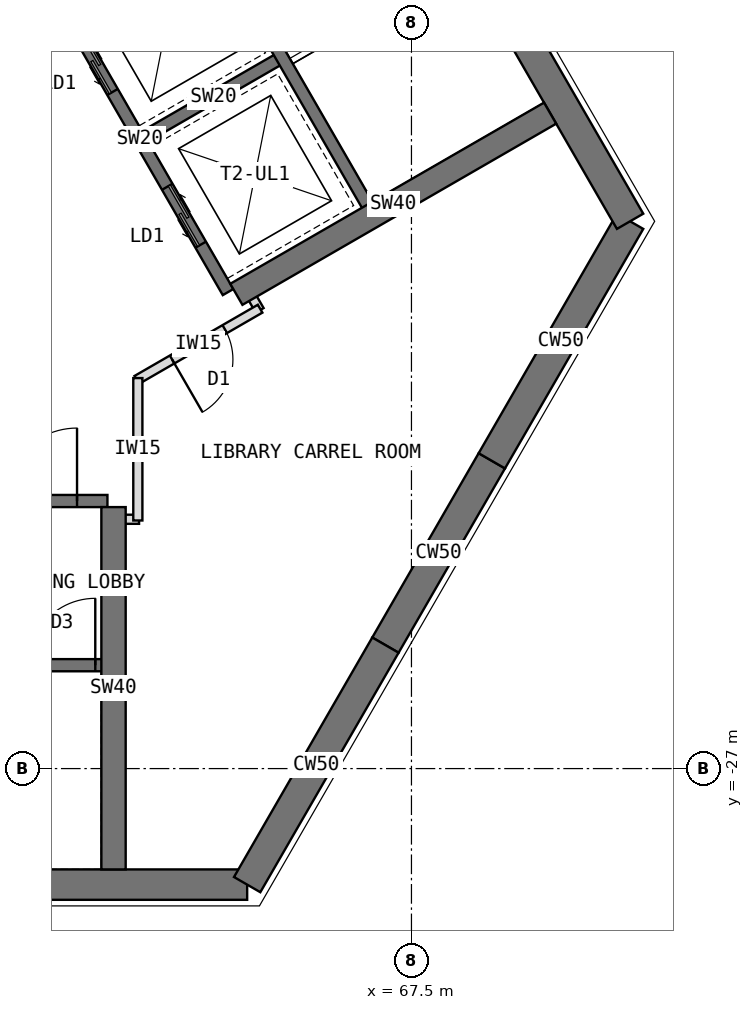
"""IFC4 building model, lengths in metres.
Left out: names, types, materials, properties, quantities, classifications, styles, units other than length and angle.
Written with IfcOpenShell. Run it as: python <this file> out.ifc"""

import sys

from ifc_helpers import new_model, si_unit, direction, frame, frame_2d, origin, place, context, subcontext, project, spatial, rectangle, extrude, element, fill, save


model = new_model("IFC4")
c1 = context("Model", 3, precision=1e-05, world=origin(), true_north=direction((0.0, 1.0)))
c2 = subcontext(c1, "Body", "Model", "MODEL_VIEW")
j1 = project(units=[si_unit("LENGTHUNIT", "METRE"), si_unit("PLANEANGLEUNIT", "RADIAN")], contexts=[c1])
p1 = place(None, origin())
s1 = spatial("IfcSite", under=j1, at=p1, CompositionType="ELEMENT")
p2 = place(p1, origin())
s2 = spatial("IfcBuilding", under=s1, at=p2, CompositionType="ELEMENT")
p3 = place(p2, frame((0.0, 0.0, 194.5)))
s3 = spatial("IfcBuildingStorey", under=s2, at=p3, CompositionType="ELEMENT", Elevation=194.5)
p4 = place(p3, frame((52.202, -28.908, 0.0), z_axis=(0.0, 0.0, 1.0), x_axis=(1.0, 0.0, 0.0)))
e1 = element("IfcWall", 1, at=p4, inside=s3, PredefinedType="SHEAR", context=c2, shape_type="SweptSolid", body=[
    extrude(rectangle(XDim=12.596, YDim=0.5, at=frame_2d((6.298, 0.0))), origin(), (0.0, 0.0, 1.0), 4.0),
])
p5 = place(p3, frame((64.798, -28.908, 0.0), z_axis=(0.0, 0.0, 1.0), x_axis=(0.499984222037, 0.866034513004, 0.0)))
e2 = element("IfcWall", 2, at=p5, inside=s3, PredefinedType="SHEAR", context=c2, shape_type="SweptSolid", body=[
    extrude(rectangle(XDim=4.548, YDim=0.5, at=frame_2d((2.274, 0.0))), origin(), (0.0, 0.0, 1.0), 4.0),
])
p6 = place(p3, frame((67.072, -24.97, 0.0), z_axis=(0.0, 0.0, 1.0), x_axis=(0.500010275428, 0.866019471182, 0.0)))
e3 = element("IfcWall", 3, at=p6, inside=s3, PredefinedType="SHEAR", context=c2, shape_type="SweptSolid", body=[
    extrude(rectangle(XDim=3.5, YDim=0.5, at=frame_2d((1.75, 0.0))), origin(), (0.0, 0.0, 1.0), 4.0),
])
p7 = place(p3, frame((68.822, -21.939, 0.0), z_axis=(0.0, 0.0, 1.0), x_axis=(0.500024481964, 0.866011268655, 0.0)))
e4 = element("IfcWall", 4, at=p7, inside=s3, PredefinedType="SHEAR", context=c2, shape_type="SweptSolid", body=[
    extrude(rectangle(XDim=4.548, YDim=0.5, at=frame_2d((2.274, 0.0))), origin(), (0.0, 0.0, 1.0), 4.0),
])
p8 = place(p3, frame((71.096, -18.0, 0.0), z_axis=(0.0, 0.0, 1.0), x_axis=(-0.500005998175, 0.866021940709, 0.0)))
e5 = element("IfcWall", 5, at=p8, inside=s3, PredefinedType="SHEAR", context=c2, shape_type="SweptSolid", body=[
    extrude(rectangle(XDim=12.596, YDim=0.5, at=frame_2d((6.298, 0.0))), origin(), (0.0, 0.0, 1.0), 4.0),
])
p9 = place(p3, frame((54.5, -22.6, 0.0), z_axis=(0.0, 0.0, 1.0), x_axis=(1.0, 0.0, 0.0)))
e6 = element("IfcWall", 6, at=p9, inside=s3, PredefinedType="SHEAR", context=c2, shape_type="SweptSolid", body=[
    extrude(rectangle(XDim=8.0, YDim=0.2, at=frame_2d((4.0, 0.0))), origin(), (0.0, 0.0, 1.0), 4.0),
])
p10 = place(p9, frame((6.3, 0.0, 0.0)))
e7 = element("IfcOpeningElement", 7, at=p10, cuts=e6, PredefinedType="OPENING", context=c2, shape_type="SweptSolid", body=[
    extrude(rectangle(XDim=1.2, YDim=2.1, at=frame_2d((0.6, 1.05))), frame((0.0, 0.11, 0.0), z_axis=(0.0, -1.0, 0.0), x_axis=(1.0, 0.0, 0.0)), (0.0, 0.0, 1.0), 0.22),
])
p11 = place(p9, frame((0.9, 0.0, 0.0)))
e8 = element("IfcOpeningElement", 8, at=p11, cuts=e6, PredefinedType="OPENING", context=c2, shape_type="SweptSolid", body=[
    extrude(rectangle(XDim=1.1, YDim=2.2, at=frame_2d((0.55, 1.1))), frame((0.0, 0.11, 0.0), z_axis=(0.0, -1.0, 0.0), x_axis=(1.0, 0.0, 0.0)), (0.0, 0.0, 1.0), 0.22),
])
p12 = place(p3, frame((54.5, -25.3, 0.0), z_axis=(0.0, 0.0, 1.0), x_axis=(1.0, 0.0, 0.0)))
e9 = element("IfcWall", 9, at=p12, inside=s3, PredefinedType="SHEAR", context=c2, shape_type="SweptSolid", body=[
    extrude(rectangle(XDim=8.0, YDim=0.2, at=frame_2d((4.0, 0.0))), origin(), (0.0, 0.0, 1.0), 4.0),
])
p13 = place(p12, frame((6.7, 0.0, 0.0)))
e10 = element("IfcOpeningElement", 10, at=p13, cuts=e9, PredefinedType="OPENING", context=c2, shape_type="SweptSolid", body=[
    extrude(rectangle(XDim=1.1, YDim=2.1, at=frame_2d((0.55, 1.05))), frame((0.0, 0.11, 0.0), z_axis=(0.0, -1.0, 0.0), x_axis=(1.0, 0.0, 0.0)), (0.0, 0.0, 1.0), 0.22),
])
p14 = place(p3, frame((62.6, -22.7, 0.0), z_axis=(0.0, 0.0, 1.0), x_axis=(0.0, -1.0, 0.0)))
e11 = element("IfcWall", 11, at=p14, inside=s3, PredefinedType="SHEAR", context=c2, shape_type="SweptSolid", body=[
    extrude(rectangle(XDim=5.958, YDim=0.4, at=frame_2d((2.979, 0.0))), origin(), (0.0, 0.0, 1.0), 4.0),
])
p15 = place(p3, frame((64.484, -19.164, 0.0), z_axis=(0.0, 0.0, 1.0), x_axis=(-0.49999894854, 0.866026010844, 0.0)))
e12 = element("IfcWall", 12, at=p15, inside=s3, PredefinedType="SHEAR", context=c2, shape_type="SweptSolid", body=[
    extrude(rectangle(XDim=8.0, YDim=0.2, at=frame_2d((4.0, 0.0))), origin(), (0.0, 0.0, 1.0), 4.0),
])
p16 = place(p15, frame((6.3, 0.0, 0.0)))
e13 = element("IfcOpeningElement", 13, at=p16, cuts=e12, PredefinedType="OPENING", context=c2, shape_type="SweptSolid", body=[
    extrude(rectangle(XDim=1.2, YDim=2.1, at=frame_2d((0.6, 1.05))), frame((0.0, 0.11, 0.0), z_axis=(0.0, -1.0, 0.0), x_axis=(1.0, 0.0, 0.0)), (0.0, 0.0, 1.0), 0.22),
])
p17 = place(p15, frame((0.9, 0.0, 0.0)))
e14 = element("IfcOpeningElement", 14, at=p17, cuts=e12, PredefinedType="OPENING", context=c2, shape_type="SweptSolid", body=[
    extrude(rectangle(XDim=1.1, YDim=2.2, at=frame_2d((0.55, 1.1))), frame((0.0, 0.11, 0.0), z_axis=(0.0, -1.0, 0.0), x_axis=(1.0, 0.0, 0.0)), (0.0, 0.0, 1.0), 0.22),
])
p18 = place(p15, frame((3.8, 0.0, 0.0)))
e15 = element("IfcOpeningElement", 15, at=p18, cuts=e12, PredefinedType="OPENING", context=c2, shape_type="SweptSolid", body=[
    extrude(rectangle(XDim=1.1, YDim=2.2, at=frame_2d((0.55, 1.1))), frame((0.0, 0.11, 0.0), z_axis=(0.0, -1.0, 0.0), x_axis=(1.0, 0.0, 0.0)), (0.0, 0.0, 1.0), 0.22),
])
p19 = place(p3, frame((63.12, -16.603, 0.0), z_axis=(0.0, 0.0, 1.0), x_axis=(0.866062058628, 0.499936506574, 0.0)))
e16 = element("IfcWall", 16, at=p19, inside=s3, PredefinedType="SHEAR", context=c2, shape_type="SweptSolid", body=[
    extrude(rectangle(XDim=2.6, YDim=0.2, at=frame_2d((1.3, 0.0))), origin(), (0.0, 0.0, 1.0), 4.0),
])
p20 = place(p3, frame((66.822, -17.814, 0.0), z_axis=(0.0, 0.0, 1.0), x_axis=(-0.49999894854, 0.866026010844, 0.0)))
e17 = element("IfcWall", 17, at=p20, inside=s3, PredefinedType="SHEAR", context=c2, shape_type="SweptSolid", body=[
    extrude(rectangle(XDim=8.0, YDim=0.2, at=frame_2d((4.0, 0.0))), origin(), (0.0, 0.0, 1.0), 4.0),
])
p21 = place(p20, frame((6.7, 0.0, 0.0)))
e18 = element("IfcOpeningElement", 18, at=p21, cuts=e17, PredefinedType="OPENING", context=c2, shape_type="SweptSolid", body=[
    extrude(rectangle(XDim=1.1, YDim=2.1, at=frame_2d((0.55, 1.05))), frame((0.0, 0.11, 0.0), z_axis=(0.0, -1.0, 0.0), x_axis=(1.0, 0.0, 0.0)), (0.0, 0.0, 1.0), 0.22),
])
p22 = place(p3, frame((64.62, -19.201, 0.0), z_axis=(0.0, 0.0, 1.0), x_axis=(0.866012946976, 0.500021575205, 0.0)))
e19 = element("IfcWall", 19, at=p22, inside=s3, PredefinedType="SHEAR", context=c2, shape_type="SweptSolid", body=[
    extrude(rectangle(XDim=5.958, YDim=0.4, at=frame_2d((2.979, 0.0))), origin(), (0.0, 0.0, 1.0), 4.0),
])
for number, where, z_axis, x_axis in (
    (20, (63.02, -22.9, 0.0), (0.0, 0.0, 1.0), (-1.0, 0.0, 0.0)),
    (21, (64.789, -19.092, 0.0), (0.0, 0.0, 1.0), (0.5, -0.866, 0.0)),
):
    element("IfcWall", number, at=place(p3, frame(where, z_axis=z_axis, x_axis=x_axis)), inside=s3, PredefinedType="PARTITIONING", context=c2, shape_type="SweptSolid", body=[
        extrude(rectangle(XDim=0.43, YDim=0.15, at=frame_2d((0.215, 0.0))), origin(), (0.0, 0.0, 1.0), 3.8),
    ])
p23 = place(p3, frame((65.011, -19.437, 0.0), z_axis=(0.0, 0.0, 1.0), x_axis=(-0.865982457891, -0.500074377092, 0.0)))
e22 = element("IfcWall", 22, at=p23, inside=s3, PredefinedType="PARTITIONING", context=c2, shape_type="SweptSolid", body=[
    extrude(rectangle(XDim=2.342, YDim=0.15, at=frame_2d((1.171, 0.0))), origin(), (0.0, 0.0, 1.0), 3.8),
])
p24 = place(p23, frame((0.671, 0.0, 0.0)))
e23 = element("IfcOpeningElement", 23, at=p24, cuts=e22, PredefinedType="OPENING", context=c2, shape_type="SweptSolid", body=[
    extrude(rectangle(XDim=1.0, YDim=2.1, at=frame_2d((0.5, 1.05))), frame((0.0, 0.085, 0.0), z_axis=(0.0, -1.0, 0.0), x_axis=(1.0, 0.0, 0.0)), (0.0, 0.0, 1.0), 0.17),
])
p25 = place(p3, frame((63.0, -20.578, 0.0), z_axis=(0.0, 0.0, 1.0), x_axis=(0.0, -1.0, 0.0)))
e24 = element("IfcWall", 24, at=p25, inside=s3, PredefinedType="PARTITIONING", context=c2, shape_type="SweptSolid", body=[
    extrude(rectangle(XDim=2.342, YDim=0.15, at=frame_2d((1.171, 0.0))), origin(), (0.0, 0.0, 1.0), 3.8),
])
p26 = place(p10, origin())
e25 = element("IfcDoor", 25, at=p26, inside=s3, OperationType="SINGLE_SWING_RIGHT", PredefinedType="DOOR", context=c2, shape_type="SweptSolid", body=[
    extrude(rectangle(XDim=1.2, YDim=2.1, at=frame_2d((0.6, 1.05))), frame((0.0, 0.025, 0.0), z_axis=(0.0, -1.0, 0.0), x_axis=(1.0, 0.0, 0.0)), (0.0, 0.0, 1.0), 0.05),
])
fill(e7, e25)
p27 = place(p13, origin())
e26 = element("IfcDoor", 26, at=p27, inside=s3, OperationType="SINGLE_SWING_RIGHT", PredefinedType="DOOR", context=c2, shape_type="SweptSolid", body=[
    extrude(rectangle(XDim=1.1, YDim=2.1, at=frame_2d((0.55, 1.05))), frame((0.0, 0.025, 0.0), z_axis=(0.0, -1.0, 0.0), x_axis=(1.0, 0.0, 0.0)), (0.0, 0.0, 1.0), 0.05),
])
fill(e10, e26)
p28 = place(p17, origin())
e27 = element("IfcDoor", 27, at=p28, inside=s3, OperationType="DOUBLE_DOOR_SLIDING", PredefinedType="DOOR", context=c2, shape_type="SweptSolid", body=[
    extrude(rectangle(XDim=1.1, YDim=2.2, at=frame_2d((0.55, 1.1))), frame((0.0, 0.025, 0.0), z_axis=(0.0, -1.0, 0.0), x_axis=(1.0, 0.0, 0.0)), (0.0, 0.0, 1.0), 0.05),
])
fill(e14, e27)
p29 = place(p18, origin())
e28 = element("IfcDoor", 28, at=p29, inside=s3, OperationType="DOUBLE_DOOR_SLIDING", PredefinedType="DOOR", context=c2, shape_type="SweptSolid", body=[
    extrude(rectangle(XDim=1.1, YDim=2.2, at=frame_2d((0.55, 1.1))), frame((0.0, 0.025, 0.0), z_axis=(0.0, -1.0, 0.0), x_axis=(1.0, 0.0, 0.0)), (0.0, 0.0, 1.0), 0.05),
])
fill(e15, e28)
p30 = place(p24, origin())
e29 = element("IfcDoor", 29, at=p30, inside=s3, OperationType="SINGLE_SWING_RIGHT", PredefinedType="DOOR", context=c2, shape_type="SweptSolid", body=[
    extrude(rectangle(XDim=1.0, YDim=2.1, at=frame_2d((0.5, 1.05))), frame((0.0, 0.025, 0.0), z_axis=(0.0, -1.0, 0.0), x_axis=(1.0, 0.0, 0.0)), (0.0, 0.0, 1.0), 0.05),
])
fill(e23, e29)
save(model, sys.argv[1])
